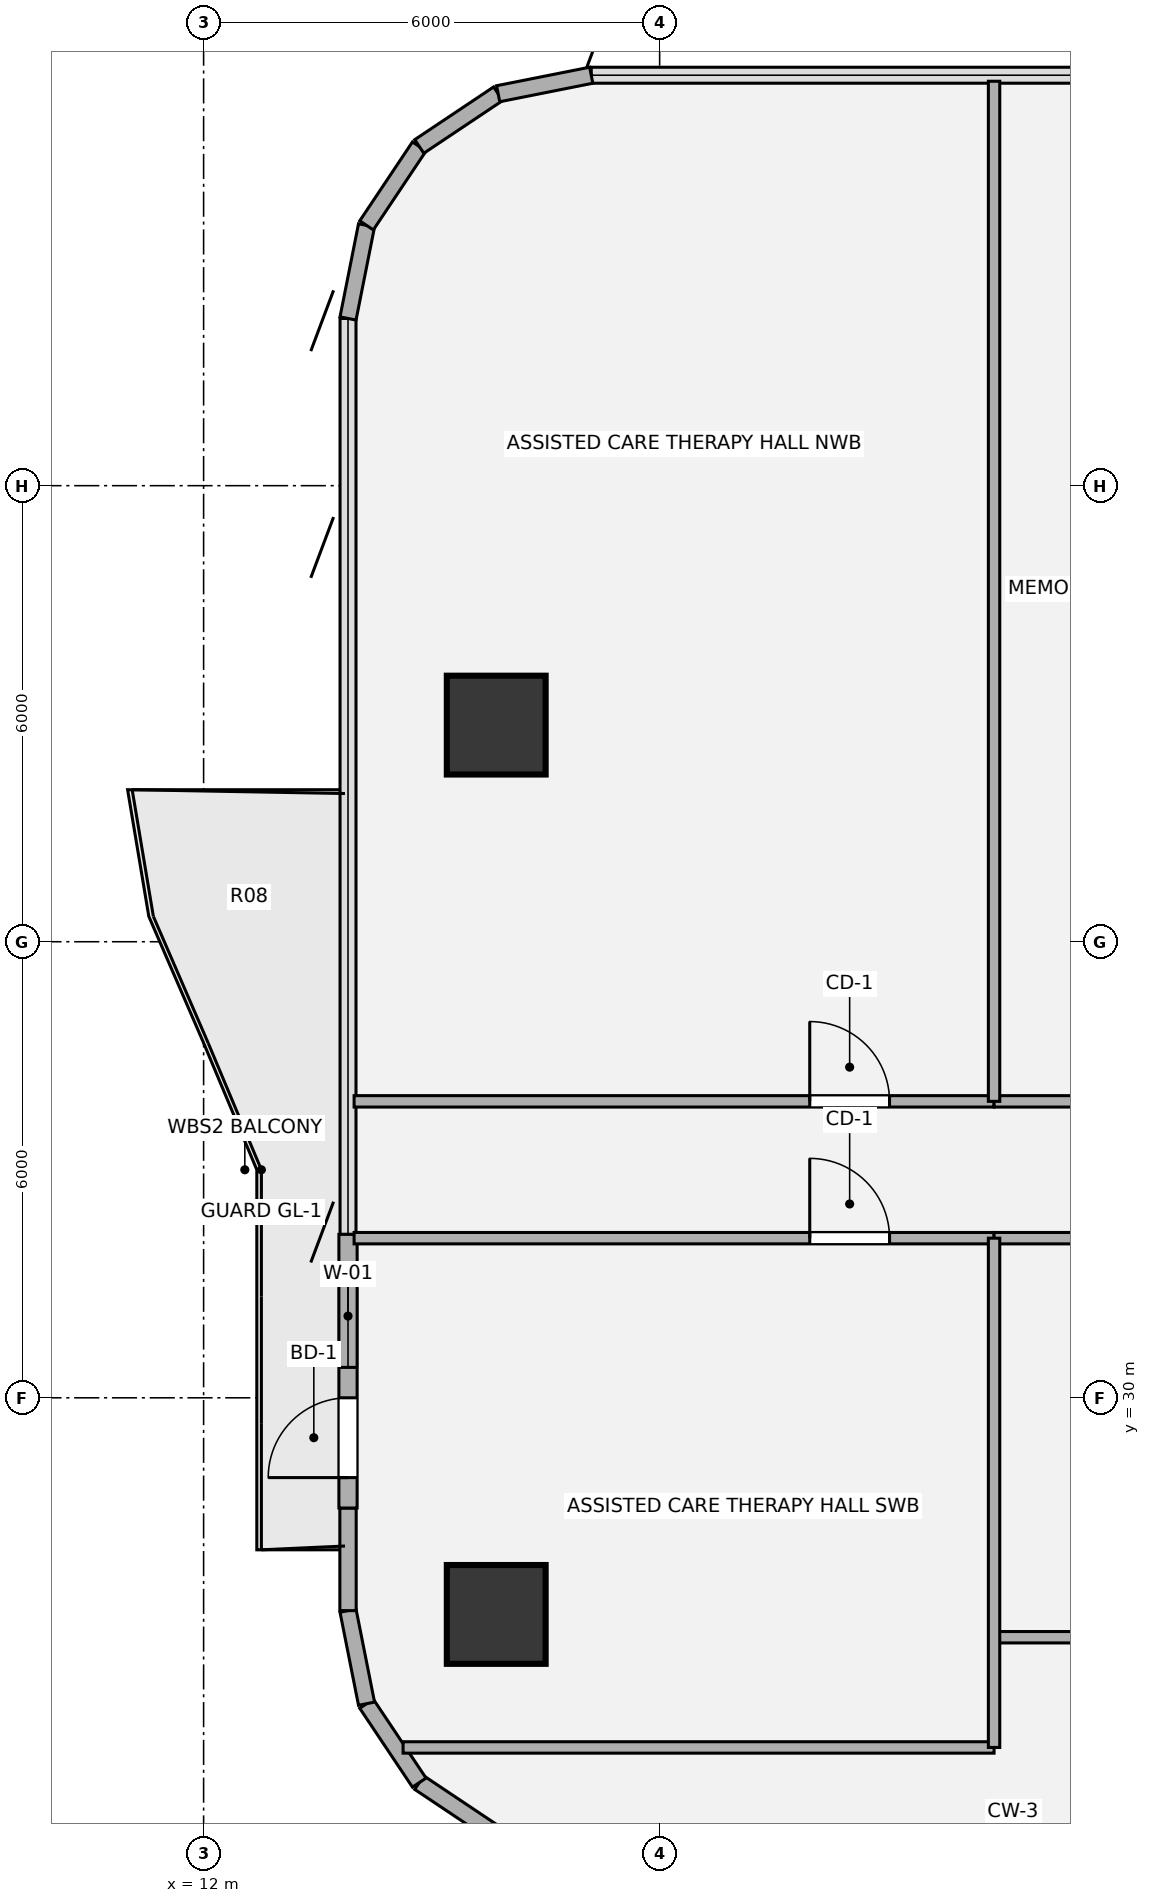
"""IFC4 building model, lengths in metres.
Left out: names, types, materials, properties, quantities, classifications, styles, units other than length and angle.
Written with IfcOpenShell. Run it as: python <this file> out.ifc"""

import sys

from ifc_helpers import new_model, si_unit, direction, frame, frame_2d, origin, origin_2d, place, context, subcontext, project, spatial, rectangle, hollow_circle, extrude, source, transform, mapped, element, fill, save


model = new_model("IFC4")
c1 = context("Model", 3, precision=1e-05, world=origin(), true_north=direction((0.0, 1.0)))
c2 = subcontext(c1, "Body", "Model", "MODEL_VIEW")
j1 = project(units=[si_unit("LENGTHUNIT", "METRE"), si_unit("PLANEANGLEUNIT", "RADIAN")], contexts=[c1])
p1 = place(None, origin())
s1 = spatial("IfcSite", under=j1, at=p1, CompositionType="ELEMENT")
p2 = place(p1, origin())
s2 = spatial("IfcBuilding", under=s1, at=p2, CompositionType="ELEMENT")
p3 = place(p2, frame((0.0, 0.0, 104.94)))
s3 = spatial("IfcBuildingStorey", under=s2, at=p3, CompositionType="ELEMENT", Elevation=104.94)
m1 = source(origin(), c2, "Body", "SweptSolid", [
    extrude(hollow_circle(Radius=0.65, WallThickness=0.045, at=origin_2d()), origin(), (0.0, 0.0, 1.0), 3.78),
])
for number, where, z_axis, x_axis in (
    (1, (15.85, 27.15, 0.0), (0.0, 0.0, 1.0), (1.0, 0.0, 0.0)),
    (2, (15.85, 38.85, 0.0), (0.0, 0.0, 1.0), (1.0, 0.0, 0.0)),
):
    element("IfcColumn", number, at=place(p3, frame(where, z_axis=z_axis, x_axis=x_axis)), inside=s3, PredefinedType="COLUMN", context=c2, shape_type="MappedRepresentation", body=[
        mapped(m1, transform((0.0, 0.0, 0.0), x_axis=(1.0, 0.0, 0.0), y_axis=(0.0, 1.0, 0.0), z_axis=(0.0, 0.0, 1.0), scale=1.0)),
    ])
for number, where, z_axis, x_axis in (
    (3, (15.875, 24.244, 0.0), (0.0, 0.0, 1.0), (-0.831, 0.556, 0.0)),
    (4, (14.837, 24.937, 0.0), (0.0, 0.0, 1.0), (-0.556, 0.831, 0.0)),
    (5, (14.144, 25.975, 0.0), (0.0, 0.0, 1.0), (-0.195, 0.981, 0.0)),
):
    element("IfcWall", number, at=place(p3, frame(where, z_axis=z_axis, x_axis=x_axis)), inside=s3, PredefinedType="SOLIDWALL", context=c2, shape_type="SweptSolid", body=[
        extrude(rectangle(XDim=1.249, YDim=0.215, at=frame_2d((0.624, 0.0))), origin(), (0.0, 0.0, 1.0), 3.53),
    ])
p4 = place(p3, frame((13.9, 27.2, 0.0), z_axis=(0.0, 0.0, 1.0), x_axis=(0.0, 1.0, 0.0)))
e6 = element("IfcWall", 6, at=p4, inside=s3, PredefinedType="SOLIDWALL", context=c2, shape_type="SweptSolid", body=[
    extrude(rectangle(XDim=1.35, YDim=0.215, at=frame_2d((0.675, 0.0))), origin(), (0.0, 0.0, 1.0), 3.53),
])
p5 = place(p3, frame((13.9, 28.55, 0.0), z_axis=(0.0, 0.0, 1.0), x_axis=(0.0, 1.0, 0.0)))
e7 = element("IfcWall", 7, at=p5, inside=s3, PredefinedType="SOLIDWALL", context=c2, shape_type="SweptSolid", body=[
    extrude(rectangle(XDim=3.6, YDim=0.24, at=frame_2d((1.8, 0.0))), origin(), (0.0, 0.0, 1.0), 3.53),
])
p6 = place(p5, frame((0.4, 0.0, 0.0)))
e8 = element("IfcOpeningElement", 8, at=p6, cuts=e7, PredefinedType="OPENING", context=c2, shape_type="SweptSolid", body=[
    extrude(rectangle(XDim=1.05, YDim=2.15, at=origin_2d()), frame((0.525, 0.13, 1.075), z_axis=(0.0, -1.0, 0.0), x_axis=(1.0, 0.0, 0.0)), (0.0, 0.0, 1.0), 0.26),
])
p7 = place(p5, frame((1.85, 0.0, 0.85)))
e9 = element("IfcOpeningElement", 9, at=p7, cuts=e7, PredefinedType="OPENING", context=c2, shape_type="SweptSolid", body=[
    extrude(rectangle(XDim=1.35, YDim=1.35, at=origin_2d()), frame((0.675, 0.13, 0.675), z_axis=(0.0, -1.0, 0.0), x_axis=(1.0, 0.0, 0.0)), (0.0, 0.0, 1.0), 0.26),
])
for number, where, z_axis, x_axis in (
    (10, (13.9, 44.2, 0.0), (0.0, 0.0, 1.0), (0.195, 0.981, 0.0)),
    (11, (14.144, 45.425, 0.0), (0.0, 0.0, 1.0), (0.556, 0.831, 0.0)),
    (12, (14.837, 46.463, 0.0), (0.0, 0.0, 1.0), (0.831, 0.556, 0.0)),
    (13, (15.875, 47.156, 0.0), (0.0, 0.0, 1.0), (0.981, 0.195, 0.0)),
):
    element("IfcWall", number, at=place(p3, frame(where, z_axis=z_axis, x_axis=x_axis)), inside=s3, PredefinedType="SOLIDWALL", context=c2, shape_type="SweptSolid", body=[
        extrude(rectangle(XDim=1.249, YDim=0.215, at=frame_2d((0.624, 0.0))), origin(), (0.0, 0.0, 1.0), 3.53),
    ])
p8 = place(p3, frame((14.624, 25.4, 0.0), z_axis=(0.0, 0.0, 1.0), x_axis=(1.0, 0.0, 0.0)))
e14 = element("IfcWall", 14, at=p8, inside=s3, PredefinedType="PARTITIONING", context=c2, shape_type="SweptSolid", body=[
    extrude(rectangle(XDim=7.776, YDim=0.15, at=frame_2d((3.888, 0.0))), origin(), (0.0, 0.0, 1.0), 3.5),
])
p9 = place(p3, frame((22.4, 26.85, 0.0), z_axis=(0.0, 0.0, 1.0), x_axis=(1.0, 0.0, 0.0)))
e15 = element("IfcWall", 15, at=p9, inside=s3, PredefinedType="PARTITIONING", context=c2, shape_type="SweptSolid", body=[
    extrude(rectangle(XDim=5.2, YDim=0.15, at=frame_2d((2.6, 0.0))), origin(), (0.0, 0.0, 1.0), 3.055),
])
p10 = place(p3, frame((13.98, 32.1, 0.0), z_axis=(0.0, 0.0, 1.0), x_axis=(1.0, 0.0, 0.0)))
e16 = element("IfcWall", 16, at=p10, inside=s3, PredefinedType="PARTITIONING", context=c2, shape_type="SweptSolid", body=[
    extrude(rectangle(XDim=8.42, YDim=0.15, at=frame_2d((4.21, 0.0))), origin(), (0.0, 0.0, 1.0), 2.982),
])
p11 = place(p10, frame((5.995, 0.0, 0.0)))
e17 = element("IfcOpeningElement", 17, at=p11, cuts=e16, PredefinedType="OPENING", context=c2, shape_type="SweptSolid", body=[
    extrude(rectangle(XDim=1.05, YDim=2.1, at=origin_2d()), frame((0.525, 0.085, 1.05), z_axis=(0.0, -1.0, 0.0), x_axis=(1.0, 0.0, 0.0)), (0.0, 0.0, 1.0), 0.17),
])
p12 = place(p3, frame((22.4, 32.1, 0.0), z_axis=(0.0, 0.0, 1.0), x_axis=(1.0, 0.0, 0.0)))
e18 = element("IfcWall", 18, at=p12, inside=s3, PredefinedType="PARTITIONING", context=c2, shape_type="SweptSolid", body=[
    extrude(rectangle(XDim=5.2, YDim=0.15, at=frame_2d((2.6, 0.0))), origin(), (0.0, 0.0, 1.0), 2.982),
])
p13 = place(p12, frame((2.075, 0.0, 0.0)))
e19 = element("IfcOpeningElement", 19, at=p13, cuts=e18, PredefinedType="OPENING", context=c2, shape_type="SweptSolid", body=[
    extrude(rectangle(XDim=1.05, YDim=2.1, at=origin_2d()), frame((0.525, 0.085, 1.05), z_axis=(0.0, -1.0, 0.0), x_axis=(1.0, 0.0, 0.0)), (0.0, 0.0, 1.0), 0.17),
])
p14 = place(p3, frame((13.98, 33.9, 0.0), z_axis=(0.0, 0.0, 1.0), x_axis=(1.0, 0.0, 0.0)))
e20 = element("IfcWall", 20, at=p14, inside=s3, PredefinedType="PARTITIONING", context=c2, shape_type="SweptSolid", body=[
    extrude(rectangle(XDim=8.42, YDim=0.15, at=frame_2d((4.21, 0.0))), origin(), (0.0, 0.0, 1.0), 2.982),
])
p15 = place(p14, frame((5.995, 0.0, 0.0)))
e21 = element("IfcOpeningElement", 21, at=p15, cuts=e20, PredefinedType="OPENING", context=c2, shape_type="SweptSolid", body=[
    extrude(rectangle(XDim=1.05, YDim=2.1, at=origin_2d()), frame((0.525, 0.085, 1.05), z_axis=(0.0, -1.0, 0.0), x_axis=(1.0, 0.0, 0.0)), (0.0, 0.0, 1.0), 0.17),
])
p16 = place(p3, frame((22.4, 33.9, 0.0), z_axis=(0.0, 0.0, 1.0), x_axis=(1.0, 0.0, 0.0)))
e22 = element("IfcWall", 22, at=p16, inside=s3, PredefinedType="PARTITIONING", context=c2, shape_type="SweptSolid", body=[
    extrude(rectangle(XDim=5.2, YDim=0.15, at=frame_2d((2.6, 0.0))), origin(), (0.0, 0.0, 1.0), 2.982),
])
p17 = place(p16, frame((2.075, 0.0, 0.0)))
e23 = element("IfcOpeningElement", 23, at=p17, cuts=e22, PredefinedType="OPENING", context=c2, shape_type="SweptSolid", body=[
    extrude(rectangle(XDim=1.05, YDim=2.1, at=origin_2d()), frame((0.525, 0.085, 1.05), z_axis=(0.0, -1.0, 0.0), x_axis=(1.0, 0.0, 0.0)), (0.0, 0.0, 1.0), 0.17),
])
p18 = place(p3, frame((22.4, 25.4, 0.0), z_axis=(0.0, 0.0, 1.0), x_axis=(0.0, 1.0, 0.0)))
e24 = element("IfcWall", 24, at=p18, inside=s3, PredefinedType="PARTITIONING", context=c2, shape_type="SweptSolid", body=[
    extrude(rectangle(XDim=6.7, YDim=0.15, at=frame_2d((3.35, 0.0))), origin(), (0.0, 0.0, 1.0), 3.5),
])
p19 = place(p3, frame((22.4, 33.9, 0.0), z_axis=(0.0, 0.0, 1.0), x_axis=(0.0, 1.0, 0.0)))
e25 = element("IfcWall", 25, at=p19, inside=s3, PredefinedType="PARTITIONING", context=c2, shape_type="SweptSolid", body=[
    extrude(rectangle(XDim=13.421, YDim=0.15, at=frame_2d((6.71, 0.0))), origin(), (0.0, 0.0, 1.0), 3.5),
])
m2 = source(origin(), c2, "Body", "SweptSolid", [
    extrude(rectangle(XDim=1.05, YDim=2.15, at=origin_2d()), frame((0.525, 0.025, 1.075), z_axis=(0.0, -1.0, 0.0), x_axis=(1.0, 0.0, 0.0)), (0.0, 0.0, 1.0), 0.05),
])
p20 = place(p6, origin())
e26 = element("IfcDoor", 26, at=p20, inside=s3, OperationType="SINGLE_SWING_LEFT", PredefinedType="DOOR", context=c2, shape_type="MappedRepresentation", body=[
    mapped(m2, transform((0.0, 0.0, 0.0), x_axis=(1.0, 0.0, 0.0), y_axis=(0.0, 1.0, 0.0), z_axis=(0.0, 0.0, 1.0), scale=1.0)),
])
fill(e8, e26)
m3 = source(origin(), c2, "Body", "SweptSolid", [
    extrude(rectangle(XDim=1.35, YDim=1.35, at=origin_2d()), frame((0.675, 0.03, 0.675), z_axis=(0.0, -1.0, 0.0), x_axis=(1.0, 0.0, 0.0)), (0.0, 0.0, 1.0), 0.06),
])
p21 = place(p7, origin())
e27 = element("IfcWindow", 27, at=p21, inside=s3, PartitioningType="SINGLE_PANEL", PredefinedType="WINDOW", context=c2, shape_type="MappedRepresentation", body=[
    mapped(m3, transform((0.0, 0.0, 0.0), x_axis=(1.0, 0.0, 0.0), y_axis=(0.0, 1.0, 0.0), z_axis=(0.0, 0.0, 1.0), scale=1.0)),
])
fill(e9, e27)
m4 = source(origin(), c2, "Body", "SweptSolid", [
    extrude(rectangle(XDim=1.05, YDim=2.1, at=origin_2d()), frame((0.525, 0.025, 1.05), z_axis=(0.0, -1.0, 0.0), x_axis=(1.0, 0.0, 0.0)), (0.0, 0.0, 1.0), 0.05),
])
p22 = place(p11, origin())
e28 = element("IfcDoor", 28, at=p22, inside=s3, OperationType="SINGLE_SWING_LEFT", PredefinedType="DOOR", context=c2, shape_type="MappedRepresentation", body=[
    mapped(m4, transform((0.0, 0.0, 0.0), x_axis=(1.0, 0.0, 0.0), y_axis=(0.0, 1.0, 0.0), z_axis=(0.0, 0.0, 1.0), scale=1.0)),
])
fill(e17, e28)
p23 = place(p15, origin())
e29 = element("IfcDoor", 29, at=p23, inside=s3, OperationType="SINGLE_SWING_LEFT", PredefinedType="DOOR", context=c2, shape_type="MappedRepresentation", body=[
    mapped(m4, transform((0.0, 0.0, 0.0), x_axis=(1.0, 0.0, 0.0), y_axis=(0.0, 1.0, 0.0), z_axis=(0.0, 0.0, 1.0), scale=1.0)),
])
fill(e21, e29)
save(model, sys.argv[1])
